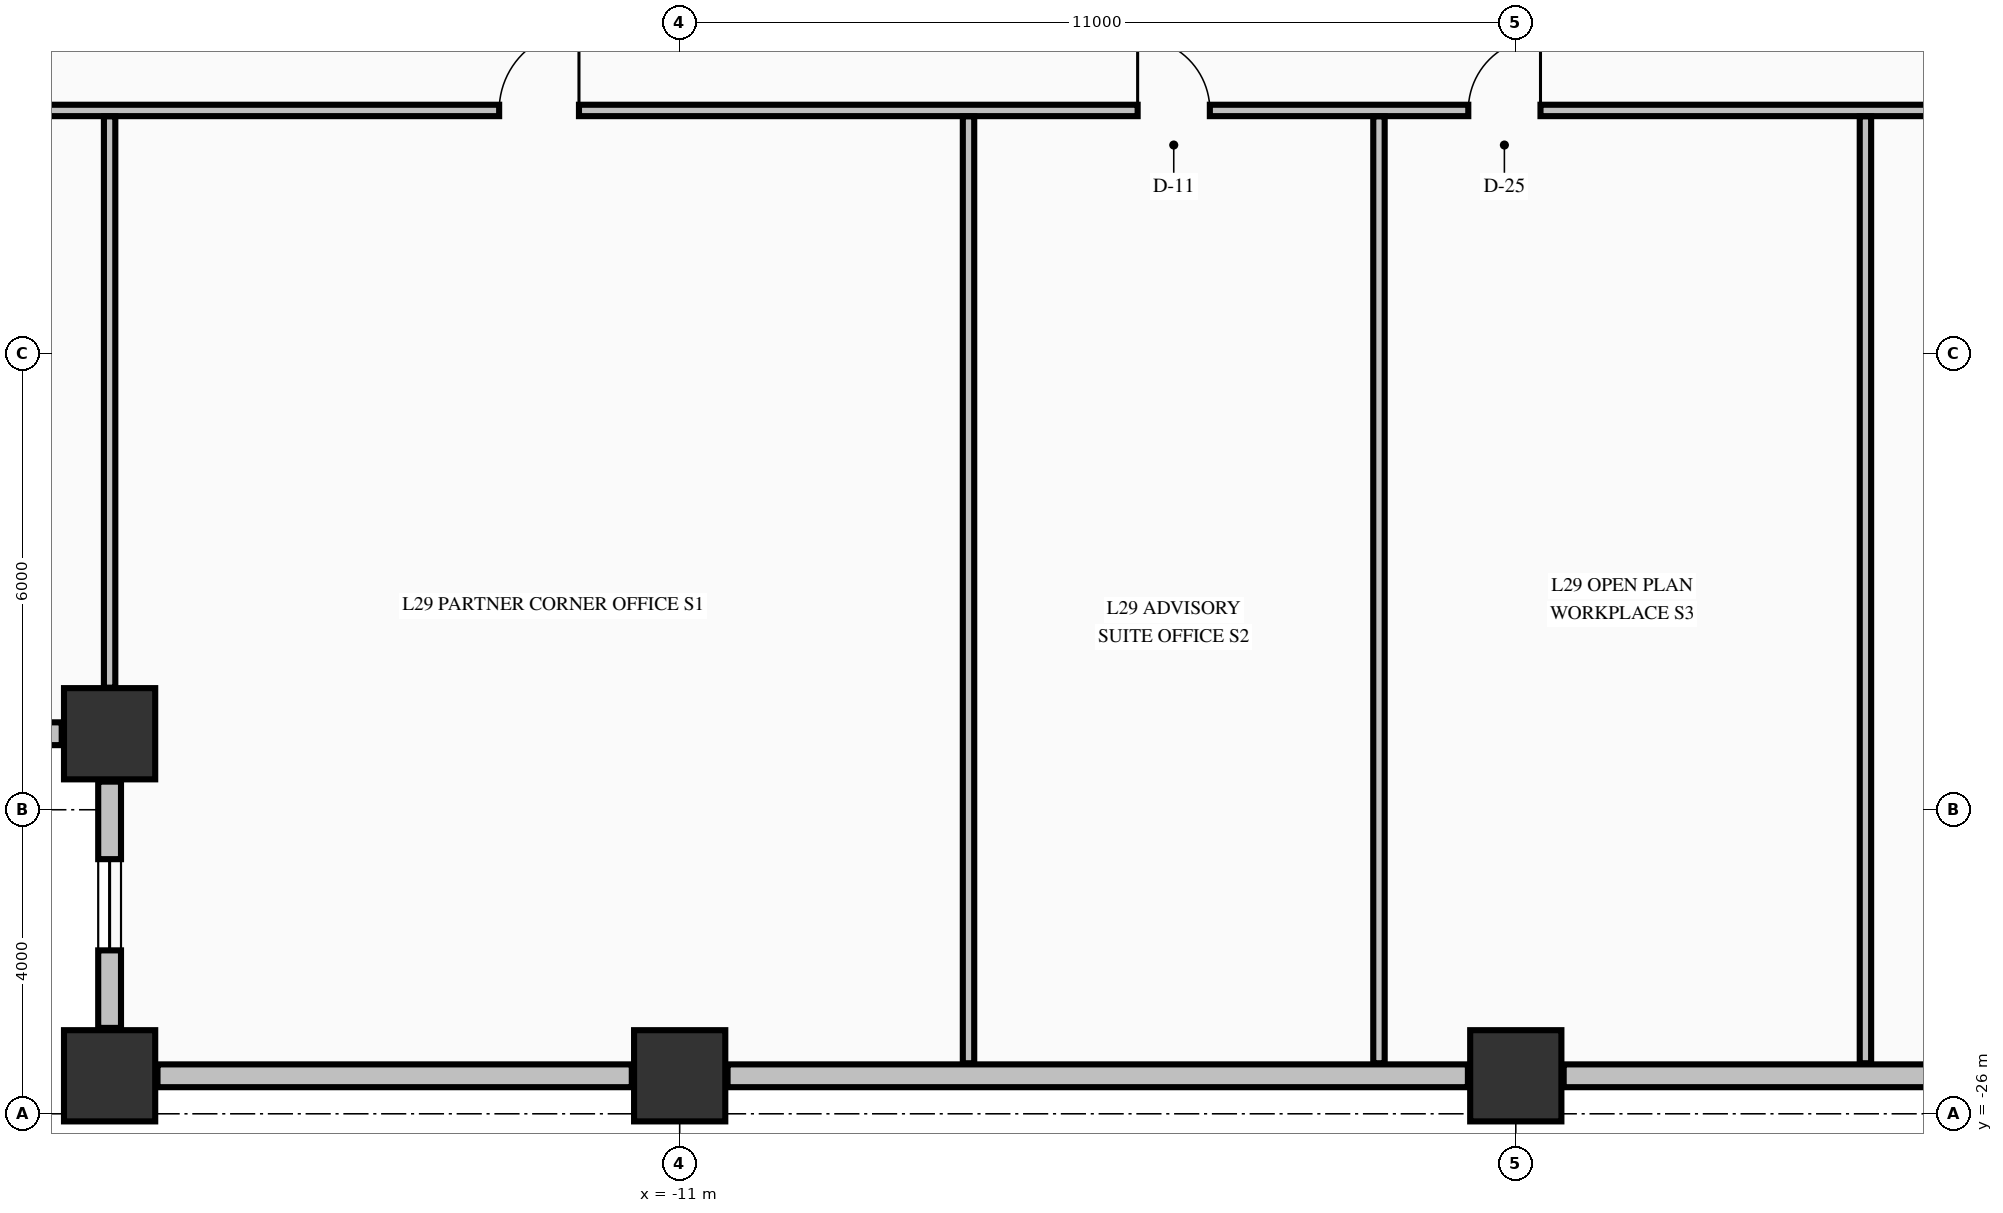
"""IFC4 building model, lengths in metres.
Left out: names, types, materials, properties, quantities, classifications, styles, units other than length and angle.
Written with IfcOpenShell. Run it as: python <this file> out.ifc"""

import sys

from ifc_helpers import new_model, si_unit, direction, frame, frame_2d, origin, origin_2d, place, context, subcontext, project, spatial, rectangle, extrude, element, fill, save


model = new_model("IFC4")
c1 = context("Model", 3, precision=1e-05, world=origin(), true_north=direction((0.0, 1.0)))
c2 = subcontext(c1, "Body", "Model", "MODEL_VIEW")
j1 = project(units=[si_unit("LENGTHUNIT", "METRE"), si_unit("PLANEANGLEUNIT", "RADIAN")], contexts=[c1])
p1 = place(None, origin())
s1 = spatial("IfcSite", under=j1, at=p1, CompositionType="ELEMENT")
p2 = place(p1, origin())
s2 = spatial("IfcBuilding", under=s1, at=p2, CompositionType="ELEMENT")
p3 = place(p2, frame((0.0, 0.0, 116.35)))
s3 = spatial("IfcBuildingStorey", under=s2, at=p3, CompositionType="ELEMENT", Elevation=116.35)
for number, where, z_axis, x_axis in (
    (1, (-18.5, -25.5, -0.425), (0.0, 0.0, 1.0), (1.0, 0.0, 0.0)),
    (2, (-11.0, -25.5, -0.425), (0.0, 0.0, 1.0), (1.0, 0.0, 0.0)),
    (3, (0.0, -25.5, -0.425), (0.0, 0.0, 1.0), (1.0, 0.0, 0.0)),
    (4, (-18.5, -21.0, -0.425), (0.0, 0.0, 1.0), (1.0, 0.0, 0.0)),
):
    element("IfcColumn", number, at=place(p3, frame(where, z_axis=z_axis, x_axis=x_axis)), inside=s3, PredefinedType="COLUMN", context=c2, shape_type="SweptSolid", body=[
        extrude(rectangle(XDim=1.2, YDim=1.2, at=origin_2d()), origin(), (0.0, 0.0, 1.0), 5.0),
    ])
p4 = place(p3, frame((-22.37, -21.0, 0.0), z_axis=(0.0, 0.0, 1.0), x_axis=(1.0, 0.0, 0.0)))
e5 = element("IfcWall", 5, at=p4, inside=s3, PredefinedType="STANDARD", context=c2, shape_type="SweptSolid", body=[
    extrude(rectangle(XDim=3.24, YDim=0.3, at=frame_2d((1.62, 0.0))), origin(), (0.0, 0.0, 1.0), 2.167),
])
p5 = place(p3, frame((-18.5, -21.63, 0.0), z_axis=(0.0, 0.0, 1.0), x_axis=(0.0, -1.0, 0.0)))
e6 = element("IfcWall", 6, at=p5, inside=s3, PredefinedType="STANDARD", context=c2, shape_type="SweptSolid", body=[
    extrude(rectangle(XDim=3.24, YDim=0.3, at=frame_2d((1.62, 0.0))), origin(), (0.0, 0.0, 1.0), 2.767),
])
p6 = place(p5, frame((1.02, 0.0, 0.82)))
e7 = element("IfcOpeningElement", 7, at=p6, cuts=e6, PredefinedType="OPENING", context=c2, shape_type="SweptSolid", body=[
    extrude(rectangle(XDim=1.2, YDim=1.65, at=frame_2d((0.6, 0.825))), frame((0.0, 0.16, 0.0), z_axis=(0.0, -1.0, 0.0), x_axis=(1.0, 0.0, 0.0)), (0.0, 0.0, 1.0), 0.32),
])
p7 = place(p3, frame((-17.87, -25.5, 0.0), z_axis=(0.0, 0.0, 1.0), x_axis=(1.0, 0.0, 0.0)))
e8 = element("IfcWall", 8, at=p7, inside=s3, PredefinedType="STANDARD", context=c2, shape_type="SweptSolid", body=[
    extrude(rectangle(XDim=6.24, YDim=0.3, at=frame_2d((3.12, 0.0))), origin(), (0.0, 0.0, 1.0), 2.167),
])
for number, where, z_axis, x_axis in (
    (9, (-10.37, -25.5, 0.0), (0.0, 0.0, 1.0), (1.0, 0.0, 0.0)),
    (10, (0.63, -25.5, 0.0), (0.0, 0.0, 1.0), (1.0, 0.0, 0.0)),
):
    element("IfcWall", number, at=place(p3, frame(where, z_axis=z_axis, x_axis=x_axis)), inside=s3, PredefinedType="STANDARD", context=c2, shape_type="SweptSolid", body=[
        extrude(rectangle(XDim=9.74, YDim=0.3, at=frame_2d((4.87, 0.0))), origin(), (0.0, 0.0, 1.0), 2.167),
    ])
p8 = place(p3, frame((-22.835, -12.8, 0.0), z_axis=(0.0, 0.0, 1.0), x_axis=(1.0, 0.0, 0.0)))
e11 = element("IfcWall", 11, at=p8, inside=s3, PredefinedType="PARTITIONING", context=c2, shape_type="SweptSolid", body=[
    extrude(rectangle(XDim=50.67, YDim=0.15, at=frame_2d((25.335, 0.0))), origin(), (0.0, 0.0, 1.0), 4.575),
])
p9 = place(p8, frame((9.46, 0.0, 0.0)))
e12 = element("IfcOpeningElement", 12, at=p9, cuts=e11, PredefinedType="OPENING", context=c2, shape_type="SweptSolid", body=[
    extrude(rectangle(XDim=1.05, YDim=2.15, at=frame_2d((0.525, 1.075))), frame((0.0, 0.085, 0.0), z_axis=(0.0, -1.0, 0.0), x_axis=(1.0, 0.0, 0.0)), (0.0, 0.0, 1.0), 0.17),
])
p10 = place(p8, frame((17.86, 0.0, 0.0)))
e13 = element("IfcOpeningElement", 13, at=p10, cuts=e11, PredefinedType="OPENING", context=c2, shape_type="SweptSolid", body=[
    extrude(rectangle(XDim=0.95, YDim=2.15, at=frame_2d((0.475, 1.075))), frame((0.0, 0.085, 0.0), z_axis=(0.0, -1.0, 0.0), x_axis=(1.0, 0.0, 0.0)), (0.0, 0.0, 1.0), 0.17),
])
p11 = place(p8, frame((22.21, 0.0, 0.0)))
e14 = element("IfcOpeningElement", 14, at=p11, cuts=e11, PredefinedType="OPENING", context=c2, shape_type="SweptSolid", body=[
    extrude(rectangle(XDim=0.95, YDim=2.02, at=frame_2d((0.475, 1.01))), frame((0.0, 0.085, 0.0), z_axis=(0.0, -1.0, 0.0), x_axis=(1.0, 0.0, 0.0)), (0.0, 0.0, 1.0), 0.17),
])
p12 = place(p8, frame((31.51, 0.0, 0.0)))
e15 = element("IfcOpeningElement", 15, at=p12, cuts=e11, PredefinedType="OPENING", context=c2, shape_type="SweptSolid", body=[
    extrude(rectangle(XDim=1.05, YDim=2.15, at=frame_2d((0.525, 1.075))), frame((0.0, 0.085, 0.0), z_axis=(0.0, -1.0, 0.0), x_axis=(1.0, 0.0, 0.0)), (0.0, 0.0, 1.0), 0.17),
])
p13 = place(p8, frame((39.11, 0.0, 0.0)))
e16 = element("IfcOpeningElement", 16, at=p13, cuts=e11, PredefinedType="OPENING", context=c2, shape_type="SweptSolid", body=[
    extrude(rectangle(XDim=1.05, YDim=2.15, at=frame_2d((0.525, 1.075))), frame((0.0, 0.085, 0.0), z_axis=(0.0, -1.0, 0.0), x_axis=(1.0, 0.0, 0.0)), (0.0, 0.0, 1.0), 0.17),
])
p14 = place(p3, frame((-18.5, -20.394, 0.0), z_axis=(0.0, 0.0, 1.0), x_axis=(0.0, 1.0, 0.0)))
e17 = element("IfcWall", 17, at=p14, inside=s3, PredefinedType="PARTITIONING", context=c2, shape_type="SweptSolid", body=[
    extrude(rectangle(XDim=7.516, YDim=0.15, at=frame_2d((3.758, 0.0))), origin(), (0.0, 0.0, 1.0), 4.575),
])
for number, where, z_axis, x_axis in (
    (18, (-7.2, -25.335, 0.0), (0.0, 0.0, 1.0), (0.0, 1.0, 0.0)),
    (19, (-1.8, -25.335, 0.0), (0.0, 0.0, 1.0), (0.0, 1.0, 0.0)),
    (20, (4.6, -25.335, 0.0), (0.0, 0.0, 1.0), (0.0, 1.0, 0.0)),
):
    element("IfcWall", number, at=place(p3, frame(where, z_axis=z_axis, x_axis=x_axis)), inside=s3, PredefinedType="PARTITIONING", context=c2, shape_type="SweptSolid", body=[
        extrude(rectangle(XDim=12.457, YDim=0.15, at=frame_2d((6.229, 0.0))), origin(), (0.0, 0.0, 1.0), 4.575),
    ])
p15 = place(p6, origin())
e21 = element("IfcWindow", 21, at=p15, inside=s3, PartitioningType="SINGLE_PANEL", PredefinedType="WINDOW", context=c2, shape_type="SweptSolid", body=[
    extrude(rectangle(XDim=1.2, YDim=1.65, at=frame_2d((0.6, 0.825))), frame((0.0, 0.03, 0.0), z_axis=(0.0, -1.0, 0.0), x_axis=(1.0, 0.0, 0.0)), (0.0, 0.0, 1.0), 0.06),
])
fill(e7, e21)
p16 = place(p9, origin())
e22 = element("IfcDoor", 22, at=p16, inside=s3, OperationType="SINGLE_SWING_RIGHT", PredefinedType="DOOR", context=c2, shape_type="SweptSolid", body=[
    extrude(rectangle(XDim=1.05, YDim=2.15, at=frame_2d((0.525, 1.075))), frame((0.0, 0.025, 0.0), z_axis=(0.0, -1.0, 0.0), x_axis=(1.0, 0.0, 0.0)), (0.0, 0.0, 1.0), 0.05),
])
fill(e12, e22)
p17 = place(p10, origin())
e23 = element("IfcDoor", 23, at=p17, inside=s3, OperationType="SINGLE_SWING_LEFT", PredefinedType="DOOR", context=c2, shape_type="SweptSolid", body=[
    extrude(rectangle(XDim=0.95, YDim=2.15, at=frame_2d((0.475, 1.075))), frame((0.0, 0.025, 0.0), z_axis=(0.0, -1.0, 0.0), x_axis=(1.0, 0.0, 0.0)), (0.0, 0.0, 1.0), 0.05),
])
fill(e13, e23)
p18 = place(p11, origin())
e24 = element("IfcDoor", 24, at=p18, inside=s3, OperationType="SINGLE_SWING_RIGHT", PredefinedType="DOOR", context=c2, shape_type="SweptSolid", body=[
    extrude(rectangle(XDim=0.95, YDim=2.02, at=frame_2d((0.475, 1.01))), frame((0.0, 0.025, 0.0), z_axis=(0.0, -1.0, 0.0), x_axis=(1.0, 0.0, 0.0)), (0.0, 0.0, 1.0), 0.05),
])
fill(e14, e24)
save(model, sys.argv[1])
